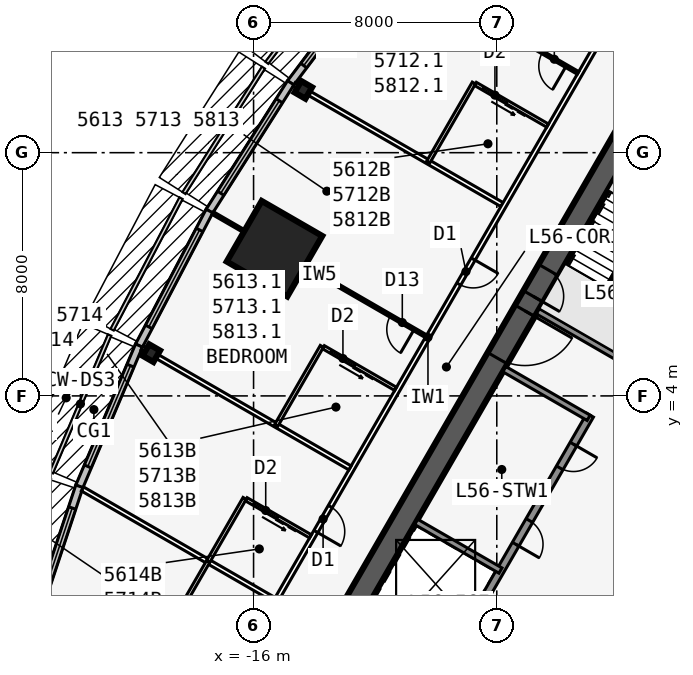
"""IFC4 building model, lengths in metres.
Left out: names, types, materials, properties, quantities, classifications, styles, units other than length and angle.
Written with IfcOpenShell. Run it as: python <this file> out.ifc"""

import sys

from ifc_helpers import new_model, si_unit, direction, frame, frame_2d, origin, origin_2d, place, context, subcontext, project, spatial, rectangle, i_section, extrude, element, fill, save


model = new_model("IFC4")
c1 = context("Model", 3, precision=1e-05, world=origin(), true_north=direction((0.0, 1.0)))
c2 = subcontext(c1, "Body", "Model", "MODEL_VIEW")
j1 = project(units=[si_unit("LENGTHUNIT", "METRE"), si_unit("PLANEANGLEUNIT", "RADIAN")], contexts=[c1])
p1 = place(None, origin())
s1 = spatial("IfcSite", under=j1, at=p1, CompositionType="ELEMENT")
p2 = place(p1, origin())
s2 = spatial("IfcBuilding", under=s1, at=p2, CompositionType="ELEMENT")
p3 = place(p2, frame((0.0, 0.0, 211.7)))
s3 = spatial("IfcBuildingStorey", under=s2, at=p3, CompositionType="ELEMENT", Elevation=211.7)
p4 = place(p3, frame((0.0, 19.052, 0.0), z_axis=(0.0, 0.0, 1.0), x_axis=(-0.499999749417, -0.866025548458, 0.0)))
e1 = element("IfcWall", 1, at=p4, inside=s3, PredefinedType="SHEAR", context=c2, shape_type="SweptSolid", body=[
    extrude(rectangle(XDim=33.0, YDim=0.75, at=frame_2d((16.5, 0.0))), origin(), (0.0, 0.0, 1.0), 3.6),
])
p5 = place(p4, frame((14.15, 0.0, 0.0)))
e2 = element("IfcOpeningElement", 2, at=p5, cuts=e1, PredefinedType="OPENING", context=c2, shape_type="SweptSolid", body=[
    extrude(rectangle(XDim=1.8, YDim=2.13, at=frame_2d((0.9, 1.065))), frame((0.0, 0.385, 0.0), z_axis=(0.0, -1.0, 0.0), x_axis=(1.0, 0.0, 0.0)), (0.0, 0.0, 1.0), 0.77),
])
p6 = place(p4, frame((12.6, 0.0, 0.0)))
e3 = element("IfcOpeningElement", 3, at=p6, cuts=e1, PredefinedType="OPENING", context=c2, shape_type="SweptSolid", body=[
    extrude(rectangle(XDim=1.0, YDim=2.13, at=frame_2d((0.5, 1.065))), frame((0.0, 0.385, 0.0), z_axis=(0.0, -1.0, 0.0), x_axis=(1.0, 0.0, 0.0)), (0.0, 0.0, 1.0), 0.77),
])
p7 = place(p3, frame((-4.929, 3.365, 0.0), z_axis=(0.0, 0.0, 1.0), x_axis=(-0.499991433582, -0.866030349552, 0.0)))
e4 = element("IfcWall", 4, at=p7, inside=s3, PredefinedType="SOLIDWALL", context=c2, shape_type="SweptSolid", body=[
    extrude(rectangle(XDim=10.633, YDim=0.25, at=frame_2d((5.316, 0.0))), origin(), (0.0, 0.0, 1.0), 3.435),
])
p8 = place(p7, frame((9.164, 0.0, 0.0)))
e5 = element("IfcOpeningElement", 5, at=p8, cuts=e4, PredefinedType="OPENING", context=c2, shape_type="SweptSolid", body=[
    extrude(rectangle(XDim=0.9, YDim=2.13, at=frame_2d((0.45, 1.065))), frame((0.0, 0.135, 0.0), z_axis=(0.0, -1.0, 0.0), x_axis=(1.0, 0.0, 0.0)), (0.0, 0.0, 1.0), 0.27),
])
p9 = place(p7, frame((1.1, 0.0, 0.0)))
e6 = element("IfcOpeningElement", 6, at=p9, cuts=e4, PredefinedType="OPENING", context=c2, shape_type="SweptSolid", body=[
    extrude(rectangle(XDim=0.9, YDim=2.13, at=frame_2d((0.45, 1.065))), frame((0.0, 0.135, 0.0), z_axis=(0.0, -1.0, 0.0), x_axis=(1.0, 0.0, 0.0)), (0.0, 0.0, 1.0), 0.27),
])
p10 = place(p7, frame((4.0, 0.0, 0.0)))
e7 = element("IfcOpeningElement", 7, at=p10, cuts=e4, PredefinedType="OPENING", context=c2, shape_type="SweptSolid", body=[
    extrude(rectangle(XDim=0.9, YDim=2.13, at=frame_2d((0.45, 1.065))), frame((0.0, 0.135, 0.0), z_axis=(0.0, -1.0, 0.0), x_axis=(1.0, 0.0, 0.0)), (0.0, 0.0, 1.0), 0.27),
])
for number, where, z_axis, x_axis in (
    (8, (-3.879, 5.184, 0.0), (0.0, 0.0, 1.0), (-0.866, 0.5, 0.0)),
    (9, (-4.979, 3.279, 0.0), (0.0, 0.0, 1.0), (-0.866, 0.5, 0.0)),
    (10, (-7.879, -1.744, 0.0), (0.0, 0.0, 1.0), (-0.866, 0.5, 0.0)),
):
    element("IfcWall", number, at=place(p3, frame(where, z_axis=z_axis, x_axis=x_axis)), inside=s3, PredefinedType="SOLIDWALL", context=c2, shape_type="SweptSolid", body=[
        extrude(rectangle(XDim=3.2, YDim=0.2, at=frame_2d((1.6, 0.0))), origin(), (0.0, 0.0, 1.0), 3.435),
    ])
for number, where, z_axis, x_axis in (
    (11, (-14.363, 14.066, 0.0), (0.0, 0.0, 1.0), (-0.866, 0.5, 0.0)),
    (12, (-19.363, 5.406, 0.0), (0.0, 0.0, 1.0), (-0.866, 0.5, 0.0)),
):
    element("IfcColumn", number, at=place(p3, frame(where, z_axis=z_axis, x_axis=x_axis)), inside=s3, PredefinedType="COLUMN", context=c2, shape_type="SweptSolid", body=[
        extrude(i_section(OverallWidth=0.411, OverallDepth=0.434, WebThickness=0.036, FlangeThickness=0.057, at=origin_2d()), origin(), (0.0, 0.0, 1.0), 3.6),
    ])
p11 = place(p3, frame((-15.312, 8.84, 0.0), z_axis=(0.0, 0.0, 1.0), x_axis=(-0.866025403784, 0.5, 0.0)))
e13 = element("IfcColumn", 13, at=p11, inside=s3, PredefinedType="COLUMN", context=c2, shape_type="SweptSolid", body=[
    extrude(rectangle(XDim=2.3, YDim=2.3, at=origin_2d()), origin(), (0.0, 0.0, 1.0), 3.6),
])
p12 = place(p3, frame((-11.748, 18.312, 0.0), z_axis=(0.0, 0.0, 1.0), x_axis=(-0.602408653511, -0.798187831388, 0.0)))
e14 = element("IfcWall", 14, at=p12, inside=s3, PredefinedType="STANDARD", context=c2, shape_type="SweptSolid", body=[
    extrude(rectangle(XDim=5.038, YDim=0.25, at=frame_2d((2.519, 0.0))), origin(), (0.0, 0.0, 1.0), 3.435),
])
p13 = place(p12, frame((0.719, 0.0, 0.45)))
e15 = element("IfcOpeningElement", 15, at=p13, cuts=e14, PredefinedType="OPENING", context=c2, shape_type="SweptSolid", body=[
    extrude(rectangle(XDim=3.6, YDim=2.6, at=frame_2d((1.8, 1.3))), frame((0.0, 0.135, 0.0), z_axis=(0.0, -1.0, 0.0), x_axis=(1.0, 0.0, 0.0)), (0.0, 0.0, 1.0), 0.27),
])
p14 = place(p3, frame((-14.777, 14.299, 0.0), z_axis=(0.0, 0.0, 1.0), x_axis=(-0.535220361449, -0.844712474568, 0.0)))
e16 = element("IfcWall", 16, at=p14, inside=s3, PredefinedType="STANDARD", context=c2, shape_type="SweptSolid", body=[
    extrude(rectangle(XDim=5.004, YDim=0.25, at=frame_2d((2.502, 0.0))), origin(), (0.0, 0.0, 1.0), 3.435),
])
p15 = place(p14, frame((0.702, 0.0, 0.45)))
e17 = element("IfcOpeningElement", 17, at=p15, cuts=e16, PredefinedType="OPENING", context=c2, shape_type="SweptSolid", body=[
    extrude(rectangle(XDim=3.6, YDim=2.6, at=frame_2d((1.8, 1.3))), frame((0.0, 0.135, 0.0), z_axis=(0.0, -1.0, 0.0), x_axis=(1.0, 0.0, 0.0)), (0.0, 0.0, 1.0), 0.27),
])
p16 = place(p3, frame((-17.45, 10.081, 0.0), z_axis=(0.0, 0.0, 1.0), x_axis=(-0.463976002579, -0.885847768542, 0.0)))
e18 = element("IfcWall", 18, at=p16, inside=s3, PredefinedType="STANDARD", context=c2, shape_type="SweptSolid", body=[
    extrude(rectangle(XDim=5.004, YDim=0.25, at=frame_2d((2.502, 0.0))), origin(), (0.0, 0.0, 1.0), 3.435),
])
p17 = place(p16, frame((0.702, 0.0, 0.45)))
e19 = element("IfcOpeningElement", 19, at=p17, cuts=e18, PredefinedType="OPENING", context=c2, shape_type="SweptSolid", body=[
    extrude(rectangle(XDim=3.6, YDim=2.6, at=frame_2d((1.8, 1.3))), frame((0.0, 0.135, 0.0), z_axis=(0.0, -1.0, 0.0), x_axis=(1.0, 0.0, 0.0)), (0.0, 0.0, 1.0), 0.27),
])
p18 = place(p3, frame((-19.768, 5.657, 0.0), z_axis=(0.0, 0.0, 1.0), x_axis=(-0.390096809471, -0.920773848044, 0.0)))
e20 = element("IfcWall", 20, at=p18, inside=s3, PredefinedType="STANDARD", context=c2, shape_type="SweptSolid", body=[
    extrude(rectangle(XDim=5.038, YDim=0.25, at=frame_2d((2.519, 0.0))), origin(), (0.0, 0.0, 1.0), 3.435),
])
p19 = place(p18, frame((0.719, 0.0, 0.45)))
e21 = element("IfcOpeningElement", 21, at=p19, cuts=e20, PredefinedType="OPENING", context=c2, shape_type="SweptSolid", body=[
    extrude(rectangle(XDim=3.6, YDim=2.6, at=frame_2d((1.8, 1.3))), frame((0.0, 0.135, 0.0), z_axis=(0.0, -1.0, 0.0), x_axis=(1.0, 0.0, 0.0)), (0.0, 0.0, 1.0), 0.27),
])
p20 = place(p3, frame((-21.729, 1.028, 0.0), z_axis=(0.0, 0.0, 1.0), x_axis=(-0.315108478109, -0.949055660656, 0.0)))
e22 = element("IfcWall", 22, at=p20, inside=s3, PredefinedType="STANDARD", context=c2, shape_type="SweptSolid", body=[
    extrude(rectangle(XDim=5.105, YDim=0.25, at=frame_2d((2.552, 0.0))), origin(), (0.0, 0.0, 1.0), 3.435),
])
p21 = place(p20, frame((0.752, 0.0, 0.45)))
e23 = element("IfcOpeningElement", 23, at=p21, cuts=e22, PredefinedType="OPENING", context=c2, shape_type="SweptSolid", body=[
    extrude(rectangle(XDim=3.6, YDim=2.6, at=frame_2d((1.8, 1.3))), frame((0.0, 0.135, 0.0), z_axis=(0.0, -1.0, 0.0), x_axis=(1.0, 0.0, 0.0)), (0.0, 0.0, 1.0), 0.27),
])
p22 = place(p3, frame((-0.425, 22.966, 0.0), z_axis=(0.0, 0.0, 1.0), x_axis=(-0.500000265775, -0.866025250339, 0.0)))
e24 = element("IfcWall", 24, at=p22, inside=s3, PredefinedType="PARTITIONING", context=c2, shape_type="SweptSolid", body=[
    extrude(rectangle(XDim=39.354, YDim=0.15, at=frame_2d((19.677, 0.0))), origin(), (0.0, 0.0, 1.0), 3.435),
])
p23 = place(p22, frame((1.102, 0.0, 0.0)))
e25 = element("IfcOpeningElement", 25, at=p23, cuts=e24, PredefinedType="OPENING", context=c2, shape_type="SweptSolid", body=[
    extrude(rectangle(XDim=0.95, YDim=2.13, at=frame_2d((0.475, 1.065))), frame((0.0, 0.085, 0.0), z_axis=(0.0, -1.0, 0.0), x_axis=(1.0, 0.0, 0.0)), (0.0, 0.0, 1.0), 0.17),
])
p24 = place(p22, frame((6.702, 0.0, 0.0)))
e26 = element("IfcOpeningElement", 26, at=p24, cuts=e24, PredefinedType="OPENING", context=c2, shape_type="SweptSolid", body=[
    extrude(rectangle(XDim=0.95, YDim=2.13, at=frame_2d((0.475, 1.065))), frame((0.0, 0.085, 0.0), z_axis=(0.0, -1.0, 0.0), x_axis=(1.0, 0.0, 0.0)), (0.0, 0.0, 1.0), 0.17),
])
p25 = place(p22, frame((16.702, 0.0, 0.0)))
e27 = element("IfcOpeningElement", 27, at=p25, cuts=e24, PredefinedType="OPENING", context=c2, shape_type="SweptSolid", body=[
    extrude(rectangle(XDim=0.95, YDim=2.13, at=frame_2d((0.475, 1.065))), frame((0.0, 0.085, 0.0), z_axis=(0.0, -1.0, 0.0), x_axis=(1.0, 0.0, 0.0)), (0.0, 0.0, 1.0), 0.17),
])
p26 = place(p22, frame((26.102, 0.0, 0.0)))
e28 = element("IfcOpeningElement", 28, at=p26, cuts=e24, PredefinedType="OPENING", context=c2, shape_type="SweptSolid", body=[
    extrude(rectangle(XDim=0.95, YDim=2.13, at=frame_2d((0.475, 1.065))), frame((0.0, 0.085, 0.0), z_axis=(0.0, -1.0, 0.0), x_axis=(1.0, 0.0, 0.0)), (0.0, 0.0, 1.0), 0.17),
])
p27 = place(p22, frame((32.302, 0.0, 0.0)))
e29 = element("IfcOpeningElement", 29, at=p27, cuts=e24, PredefinedType="OPENING", context=c2, shape_type="SweptSolid", body=[
    extrude(rectangle(XDim=0.95, YDim=2.13, at=frame_2d((0.475, 1.065))), frame((0.0, 0.085, 0.0), z_axis=(0.0, -1.0, 0.0), x_axis=(1.0, 0.0, 0.0)), (0.0, 0.0, 1.0), 0.17),
])
p28 = place(p22, frame((37.302, 0.0, 0.0)))
e30 = element("IfcOpeningElement", 30, at=p28, cuts=e24, PredefinedType="OPENING", context=c2, shape_type="SweptSolid", body=[
    extrude(rectangle(XDim=0.95, YDim=2.13, at=frame_2d((0.475, 1.065))), frame((0.0, 0.085, 0.0), z_axis=(0.0, -1.0, 0.0), x_axis=(1.0, 0.0, 0.0)), (0.0, 0.0, 1.0), 0.17),
])
p29 = place(p3, frame((-5.329, 14.623, 0.0), z_axis=(0.0, 0.0, 1.0), x_axis=(-0.866017877653, 0.500013035415, 0.0)))
e31 = element("IfcWall", 31, at=p29, inside=s3, PredefinedType="PARTITIONING", context=c2, shape_type="SweptSolid", body=[
    extrude(rectangle(XDim=7.273, YDim=0.1, at=frame_2d((3.636, 0.0))), origin(), (0.0, 0.0, 1.0), 2.589),
])
p30 = place(p29, frame((0.45, 0.0, 0.0)))
e32 = element("IfcOpeningElement", 32, at=p30, cuts=e31, PredefinedType="OPENING", context=c2, shape_type="SweptSolid", body=[
    extrude(rectangle(XDim=0.9, YDim=2.13, at=frame_2d((0.45, 1.065))), frame((0.0, 0.06, 0.0), z_axis=(0.0, -1.0, 0.0), x_axis=(1.0, 0.0, 0.0)), (0.0, 0.0, 1.0), 0.12),
])
p31 = place(p3, frame((-7.829, 10.293, 0.0), z_axis=(0.0, 0.0, 1.0), x_axis=(-0.866030558329, 0.49999107196, 0.0)))
e33 = element("IfcWall", 33, at=p31, inside=s3, PredefinedType="PARTITIONING", context=c2, shape_type="SweptSolid", body=[
    extrude(rectangle(XDim=7.894, YDim=0.15, at=frame_2d((3.947, 0.0))), origin(), (0.0, 0.0, 1.0), 2.589),
])
p32 = place(p3, frame((-10.329, 5.963, 0.0), z_axis=(0.0, 0.0, 1.0), x_axis=(-0.866016460812, 0.500015489362, 0.0)))
e34 = element("IfcWall", 34, at=p32, inside=s3, PredefinedType="PARTITIONING", context=c2, shape_type="SweptSolid", body=[
    extrude(rectangle(XDim=8.101, YDim=0.1, at=frame_2d((4.051, 0.0))), origin(), (0.0, 0.0, 1.0), 2.589),
])
p33 = place(p32, frame((0.45, 0.0, 0.0)))
e35 = element("IfcOpeningElement", 35, at=p33, cuts=e34, PredefinedType="OPENING", context=c2, shape_type="SweptSolid", body=[
    extrude(rectangle(XDim=0.9, YDim=2.13, at=frame_2d((0.45, 1.065))), frame((0.0, 0.06, 0.0), z_axis=(0.0, -1.0, 0.0), x_axis=(1.0, 0.0, 0.0)), (0.0, 0.0, 1.0), 0.12),
])
p34 = place(p3, frame((-12.829, 1.633, 0.0), z_axis=(0.0, 0.0, 1.0), x_axis=(-0.866030558329, 0.49999107196, 0.0)))
e36 = element("IfcWall", 36, at=p34, inside=s3, PredefinedType="PARTITIONING", context=c2, shape_type="SweptSolid", body=[
    extrude(rectangle(XDim=7.894, YDim=0.15, at=frame_2d((3.947, 0.0))), origin(), (0.0, 0.0, 1.0), 2.589),
])
p35 = place(p3, frame((-15.329, -2.697, 0.0), z_axis=(0.0, 0.0, 1.0), x_axis=(-0.866032413668, 0.499987858329, 0.0)))
e37 = element("IfcWall", 37, at=p35, inside=s3, PredefinedType="PARTITIONING", context=c2, shape_type="SweptSolid", body=[
    extrude(rectangle(XDim=7.273, YDim=0.15, at=frame_2d((3.636, 0.0))), origin(), (0.0, 0.0, 1.0), 2.589),
])
p36 = place(p3, frame((-8.753, 14.291, 0.0), z_axis=(0.0, 0.0, 1.0), x_axis=(-0.50002537861, -0.866010750942, 0.0)))
e38 = element("IfcWall", 38, at=p36, inside=s3, PredefinedType="PLUMBINGWALL", context=c2, shape_type="SweptSolid", body=[
    extrude(rectangle(XDim=3.0, YDim=0.12, at=frame_2d((1.5, 0.0))), origin(), (0.0, 0.0, 1.0), 3.435),
])
p37 = place(p3, frame((-6.329, 12.891, 0.0), z_axis=(0.0, 0.0, 1.0), x_axis=(-0.866035715982, 0.499982138324, 0.0)))
e39 = element("IfcWall", 39, at=p37, inside=s3, PredefinedType="PLUMBINGWALL", context=c2, shape_type="SweptSolid", body=[
    extrude(rectangle(XDim=2.74, YDim=0.12, at=frame_2d((1.37, 0.0))), origin(), (0.0, 0.0, 1.0), 3.435),
])
p38 = place(p37, frame((1.55, 0.0, 0.0)))
e40 = element("IfcOpeningElement", 40, at=p38, cuts=e39, PredefinedType="OPENING", context=c2, shape_type="SweptSolid", body=[
    extrude(rectangle(XDim=0.9, YDim=2.13, at=frame_2d((0.45, 1.065))), frame((0.0, 0.07, 0.0), z_axis=(0.0, -1.0, 0.0), x_axis=(1.0, 0.0, 0.0)), (0.0, 0.0, 1.0), 0.14),
])
p39 = place(p3, frame((-13.753, 5.631, 0.0), z_axis=(0.0, 0.0, 1.0), x_axis=(-0.499990139034, -0.866031096941, 0.0)))
e41 = element("IfcWall", 41, at=p39, inside=s3, PredefinedType="PLUMBINGWALL", context=c2, shape_type="SweptSolid", body=[
    extrude(rectangle(XDim=3.0, YDim=0.12, at=frame_2d((1.5, 0.0))), origin(), (0.0, 0.0, 1.0), 3.435),
])
p40 = place(p3, frame((-11.329, 4.231, 0.0), z_axis=(0.0, 0.0, 1.0), x_axis=(-0.866035715982, 0.499982138324, 0.0)))
e42 = element("IfcWall", 42, at=p40, inside=s3, PredefinedType="PLUMBINGWALL", context=c2, shape_type="SweptSolid", body=[
    extrude(rectangle(XDim=2.74, YDim=0.12, at=frame_2d((1.37, 0.0))), origin(), (0.0, 0.0, 1.0), 3.435),
])
p41 = place(p40, frame((1.55, 0.0, 0.0)))
e43 = element("IfcOpeningElement", 43, at=p41, cuts=e42, PredefinedType="OPENING", context=c2, shape_type="SweptSolid", body=[
    extrude(rectangle(XDim=0.9, YDim=2.13, at=frame_2d((0.45, 1.065))), frame((0.0, 0.07, 0.0), z_axis=(0.0, -1.0, 0.0), x_axis=(1.0, 0.0, 0.0)), (0.0, 0.0, 1.0), 0.14),
])
p42 = place(p3, frame((-16.293, 0.631, 0.0), z_axis=(0.0, 0.0, 1.0), x_axis=(-0.500001309137, -0.866024647952, 0.0)))
e44 = element("IfcWall", 44, at=p42, inside=s3, PredefinedType="PLUMBINGWALL", context=c2, shape_type="SweptSolid", body=[
    extrude(rectangle(XDim=2.4, YDim=0.12, at=frame_2d((1.2, 0.0))), origin(), (0.0, 0.0, 1.0), 3.435),
])
p43 = place(p3, frame((-14.128, -0.619, 0.0), z_axis=(0.0, 0.0, 1.0), x_axis=(-0.866048967903, 0.499959183527, 0.0)))
e45 = element("IfcWall", 45, at=p43, inside=s3, PredefinedType="PLUMBINGWALL", context=c2, shape_type="SweptSolid", body=[
    extrude(rectangle(XDim=2.44, YDim=0.12, at=frame_2d((1.22, 0.0))), origin(), (0.0, 0.0, 1.0), 3.435),
])
p44 = place(p43, frame((1.25, 0.0, 0.0)))
e46 = element("IfcOpeningElement", 46, at=p44, cuts=e45, PredefinedType="OPENING", context=c2, shape_type="SweptSolid", body=[
    extrude(rectangle(XDim=0.9, YDim=2.13, at=frame_2d((0.45, 1.065))), frame((0.0, 0.07, 0.0), z_axis=(0.0, -1.0, 0.0), x_axis=(1.0, 0.0, 0.0)), (0.0, 0.0, 1.0), 0.14),
])
p45 = place(p3, frame((-17.493, -1.447, 0.0), z_axis=(0.0, 0.0, 1.0), x_axis=(-0.500033551112, -0.866006032174, 0.0)))
e47 = element("IfcWall", 47, at=p45, inside=s3, PredefinedType="PLUMBINGWALL", context=c2, shape_type="SweptSolid", body=[
    extrude(rectangle(XDim=2.4, YDim=0.12, at=frame_2d((1.2, 0.0))), origin(), (0.0, 0.0, 1.0), 3.435),
])
p46 = place(p3, frame((-2.988, 9.978, 0.0), z_axis=(0.0, 0.0, 1.0), x_axis=(-0.499992232847, -0.866029888106, 0.0)))
e48 = element("IfcWall", 48, at=p46, inside=s3, PredefinedType="SOLIDWALL", context=c2, shape_type="SweptSolid", body=[
    extrude(rectangle(XDim=2.794, YDim=0.1, at=frame_2d((1.397, 0.0))), origin(), (0.0, 0.0, 1.0), 3.6),
])
p47 = place(p13, origin())
e49 = element("IfcWindow", 49, at=p47, inside=s3, PartitioningType="SINGLE_PANEL", PredefinedType="WINDOW", context=c2, shape_type="SweptSolid", body=[
    extrude(rectangle(XDim=3.6, YDim=2.6, at=frame_2d((1.8, 1.3))), frame((0.0, 0.03, 0.0), z_axis=(0.0, -1.0, 0.0), x_axis=(1.0, 0.0, 0.0)), (0.0, 0.0, 1.0), 0.06),
])
fill(e15, e49)
p48 = place(p15, origin())
e50 = element("IfcWindow", 50, at=p48, inside=s3, PartitioningType="SINGLE_PANEL", PredefinedType="WINDOW", context=c2, shape_type="SweptSolid", body=[
    extrude(rectangle(XDim=3.6, YDim=2.6, at=frame_2d((1.8, 1.3))), frame((0.0, 0.03, 0.0), z_axis=(0.0, -1.0, 0.0), x_axis=(1.0, 0.0, 0.0)), (0.0, 0.0, 1.0), 0.06),
])
fill(e17, e50)
p49 = place(p17, origin())
e51 = element("IfcWindow", 51, at=p49, inside=s3, PartitioningType="SINGLE_PANEL", PredefinedType="WINDOW", context=c2, shape_type="SweptSolid", body=[
    extrude(rectangle(XDim=3.6, YDim=2.6, at=frame_2d((1.8, 1.3))), frame((0.0, 0.03, 0.0), z_axis=(0.0, -1.0, 0.0), x_axis=(1.0, 0.0, 0.0)), (0.0, 0.0, 1.0), 0.06),
])
fill(e19, e51)
p50 = place(p19, origin())
e52 = element("IfcWindow", 52, at=p50, inside=s3, PartitioningType="SINGLE_PANEL", PredefinedType="WINDOW", context=c2, shape_type="SweptSolid", body=[
    extrude(rectangle(XDim=3.6, YDim=2.6, at=frame_2d((1.8, 1.3))), frame((0.0, 0.03, 0.0), z_axis=(0.0, -1.0, 0.0), x_axis=(1.0, 0.0, 0.0)), (0.0, 0.0, 1.0), 0.06),
])
fill(e21, e52)
p51 = place(p21, origin())
e53 = element("IfcWindow", 53, at=p51, inside=s3, PartitioningType="SINGLE_PANEL", PredefinedType="WINDOW", context=c2, shape_type="SweptSolid", body=[
    extrude(rectangle(XDim=3.6, YDim=2.6, at=frame_2d((1.8, 1.3))), frame((0.0, 0.03, 0.0), z_axis=(0.0, -1.0, 0.0), x_axis=(1.0, 0.0, 0.0)), (0.0, 0.0, 1.0), 0.06),
])
fill(e23, e53)
p52 = place(p30, origin())
e54 = element("IfcDoor", 54, at=p52, inside=s3, OperationType="SINGLE_SWING_LEFT", PredefinedType="DOOR", context=c2, shape_type="SweptSolid", body=[
    extrude(rectangle(XDim=0.9, YDim=2.13, at=frame_2d((0.45, 1.065))), frame((0.0, 0.025, 0.0), z_axis=(0.0, -1.0, 0.0), x_axis=(1.0, 0.0, 0.0)), (0.0, 0.0, 1.0), 0.05),
])
fill(e32, e54)
p53 = place(p33, origin())
e55 = element("IfcDoor", 55, at=p53, inside=s3, OperationType="SINGLE_SWING_LEFT", PredefinedType="DOOR", context=c2, shape_type="SweptSolid", body=[
    extrude(rectangle(XDim=0.9, YDim=2.13, at=frame_2d((0.45, 1.065))), frame((0.0, 0.025, 0.0), z_axis=(0.0, -1.0, 0.0), x_axis=(1.0, 0.0, 0.0)), (0.0, 0.0, 1.0), 0.05),
])
fill(e35, e55)
p54 = place(p38, origin())
e56 = element("IfcDoor", 56, at=p54, inside=s3, OperationType="SLIDING_TO_LEFT", PredefinedType="DOOR", context=c2, shape_type="SweptSolid", body=[
    extrude(rectangle(XDim=0.9, YDim=2.13, at=frame_2d((0.45, 1.065))), frame((0.0, 0.025, 0.0), z_axis=(0.0, -1.0, 0.0), x_axis=(1.0, 0.0, 0.0)), (0.0, 0.0, 1.0), 0.05),
])
fill(e40, e56)
p55 = place(p25, origin())
e57 = element("IfcDoor", 57, at=p55, inside=s3, OperationType="SINGLE_SWING_LEFT", PredefinedType="DOOR", context=c2, shape_type="SweptSolid", body=[
    extrude(rectangle(XDim=0.95, YDim=2.13, at=frame_2d((0.475, 1.065))), frame((0.0, 0.025, 0.0), z_axis=(0.0, -1.0, 0.0), x_axis=(1.0, 0.0, 0.0)), (0.0, 0.0, 1.0), 0.05),
])
fill(e27, e57)
p56 = place(p41, origin())
e58 = element("IfcDoor", 58, at=p56, inside=s3, OperationType="SLIDING_TO_LEFT", PredefinedType="DOOR", context=c2, shape_type="SweptSolid", body=[
    extrude(rectangle(XDim=0.9, YDim=2.13, at=frame_2d((0.45, 1.065))), frame((0.0, 0.025, 0.0), z_axis=(0.0, -1.0, 0.0), x_axis=(1.0, 0.0, 0.0)), (0.0, 0.0, 1.0), 0.05),
])
fill(e43, e58)
p57 = place(p44, origin())
e59 = element("IfcDoor", 59, at=p57, inside=s3, OperationType="SLIDING_TO_LEFT", PredefinedType="DOOR", context=c2, shape_type="SweptSolid", body=[
    extrude(rectangle(XDim=0.9, YDim=2.13, at=frame_2d((0.45, 1.065))), frame((0.0, 0.025, 0.0), z_axis=(0.0, -1.0, 0.0), x_axis=(1.0, 0.0, 0.0)), (0.0, 0.0, 1.0), 0.05),
])
fill(e46, e59)
p58 = place(p26, origin())
e60 = element("IfcDoor", 60, at=p58, inside=s3, OperationType="SINGLE_SWING_RIGHT", PredefinedType="DOOR", context=c2, shape_type="SweptSolid", body=[
    extrude(rectangle(XDim=0.95, YDim=2.13, at=frame_2d((0.475, 1.065))), frame((0.0, 0.025, 0.0), z_axis=(0.0, -1.0, 0.0), x_axis=(1.0, 0.0, 0.0)), (0.0, 0.0, 1.0), 0.05),
])
fill(e28, e60)
p59 = place(p5, origin())
e61 = element("IfcDoor", 61, at=p59, inside=s3, OperationType="DOUBLE_DOOR_SINGLE_SWING", PredefinedType="DOOR", context=c2, shape_type="SweptSolid", body=[
    extrude(rectangle(XDim=1.8, YDim=2.13, at=frame_2d((0.9, 1.065))), frame((0.0, 0.025, 0.0), z_axis=(0.0, -1.0, 0.0), x_axis=(1.0, 0.0, 0.0)), (0.0, 0.0, 1.0), 0.05),
])
fill(e2, e61)
p60 = place(p6, origin())
e62 = element("IfcDoor", 62, at=p60, inside=s3, OperationType="SINGLE_SWING_RIGHT", PredefinedType="DOOR", context=c2, shape_type="SweptSolid", body=[
    extrude(rectangle(XDim=1.0, YDim=2.13, at=frame_2d((0.5, 1.065))), frame((0.0, 0.025, 0.0), z_axis=(0.0, -1.0, 0.0), x_axis=(1.0, 0.0, 0.0)), (0.0, 0.0, 1.0), 0.05),
])
fill(e3, e62)
p61 = place(p9, origin())
e63 = element("IfcDoor", 63, at=p61, inside=s3, OperationType="SINGLE_SWING_LEFT", PredefinedType="DOOR", context=c2, shape_type="SweptSolid", body=[
    extrude(rectangle(XDim=0.9, YDim=2.13, at=frame_2d((0.45, 1.065))), frame((0.0, 0.025, 0.0), z_axis=(0.0, -1.0, 0.0), x_axis=(1.0, 0.0, 0.0)), (0.0, 0.0, 1.0), 0.05),
])
fill(e6, e63)
p62 = place(p10, origin())
e64 = element("IfcDoor", 64, at=p62, inside=s3, OperationType="SINGLE_SWING_RIGHT", PredefinedType="DOOR", context=c2, shape_type="SweptSolid", body=[
    extrude(rectangle(XDim=0.9, YDim=2.13, at=frame_2d((0.45, 1.065))), frame((0.0, 0.025, 0.0), z_axis=(0.0, -1.0, 0.0), x_axis=(1.0, 0.0, 0.0)), (0.0, 0.0, 1.0), 0.05),
])
fill(e7, e64)
save(model, sys.argv[1])
